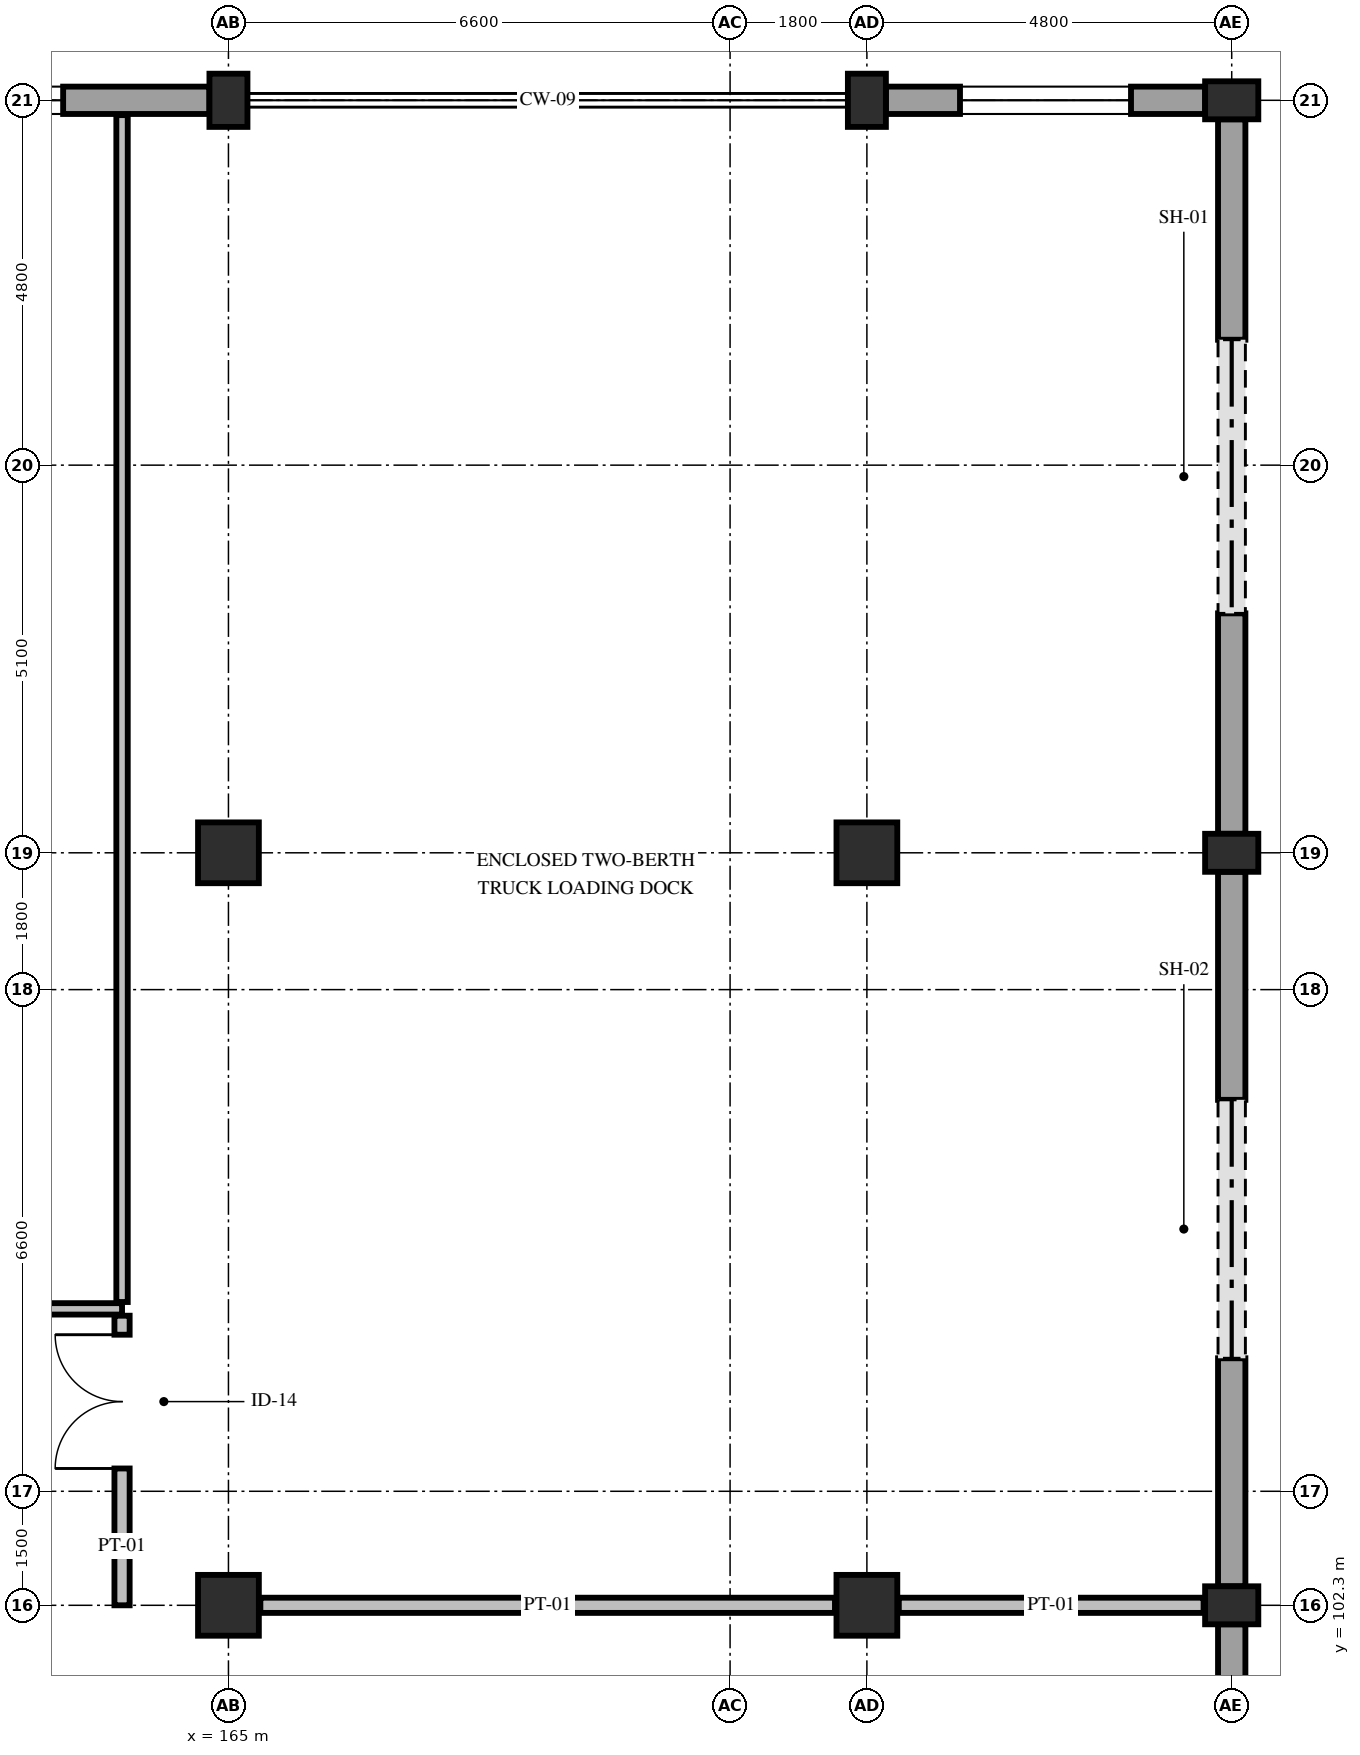
"""IFC4 building model, lengths in metres.
Left out: names, types, materials, properties, quantities, classifications, styles, units other than length and angle.
Written with IfcOpenShell. Run it as: python <this file> out.ifc"""

import sys

from ifc_helpers import new_model, si_unit, direction, frame, frame_2d, origin, origin_2d, place, context, subcontext, project, spatial, rectangle, extrude, element, fill, save


model = new_model("IFC4")
c1 = context("Model", 3, precision=1e-05, world=origin(), true_north=direction((0.0, 1.0)))
c2 = subcontext(c1, "Body", "Model", "MODEL_VIEW")
j1 = project(units=[si_unit("LENGTHUNIT", "METRE"), si_unit("PLANEANGLEUNIT", "RADIAN")], contexts=[c1])
p1 = place(None, origin())
s1 = spatial("IfcSite", under=j1, at=p1, CompositionType="ELEMENT")
p2 = place(p1, origin())
s2 = spatial("IfcBuilding", under=s1, at=p2, CompositionType="ELEMENT")
p3 = place(p2, origin())
s3 = spatial("IfcBuildingStorey", under=s2, at=p3, CompositionType="ELEMENT", Elevation=0.0)
for number, where, z_axis, x_axis in (
    (1, (165.0, 102.3, 0.0), (0.0, 0.0, 1.0), (1.0, 0.0, 0.0)),
    (2, (165.0, 112.2, 0.0), (0.0, 0.0, 1.0), (1.0, 0.0, 0.0)),
):
    element("IfcColumn", number, at=place(p3, frame(where, z_axis=z_axis, x_axis=x_axis)), inside=s3, PredefinedType="COLUMN", context=c2, shape_type="SweptSolid", body=[
        extrude(rectangle(XDim=0.8, YDim=0.8, at=origin_2d()), origin(), (0.0, 0.0, 1.0), 5.4),
    ])
p4 = place(p3, frame((165.0, 122.1, 0.0), z_axis=(0.0, 0.0, 1.0), x_axis=(1.0, 0.0, 0.0)))
e3 = element("IfcColumn", 3, at=p4, inside=s3, PredefinedType="PILASTER", context=c2, shape_type="SweptSolid", body=[
    extrude(rectangle(XDim=0.5, YDim=0.7, at=origin_2d()), origin(), (0.0, 0.0, 1.0), 5.4),
])
for number, where, z_axis, x_axis in (
    (4, (173.4, 102.3, 0.0), (0.0, 0.0, 1.0), (1.0, 0.0, 0.0)),
    (5, (173.4, 112.2, 0.0), (0.0, 0.0, 1.0), (1.0, 0.0, 0.0)),
):
    element("IfcColumn", number, at=place(p3, frame(where, z_axis=z_axis, x_axis=x_axis)), inside=s3, PredefinedType="COLUMN", context=c2, shape_type="SweptSolid", body=[
        extrude(rectangle(XDim=0.8, YDim=0.8, at=origin_2d()), origin(), (0.0, 0.0, 1.0), 5.4),
    ])
for number, where, z_axis, x_axis in (
    (6, (173.4, 122.1, 0.0), (0.0, 0.0, 1.0), (1.0, 0.0, 0.0)),
    (7, (178.2, 102.3, 0.0), (0.0, 0.0, 1.0), (0.0, 1.0, 0.0)),
    (8, (178.2, 112.2, 0.0), (0.0, 0.0, 1.0), (0.0, 1.0, 0.0)),
    (9, (178.2, 122.1, 0.0), (0.0, 0.0, 1.0), (0.0, 1.0, 0.0)),
):
    element("IfcColumn", number, at=place(p3, frame(where, z_axis=z_axis, x_axis=x_axis)), inside=s3, PredefinedType="PILASTER", context=c2, shape_type="SweptSolid", body=[
        extrude(rectangle(XDim=0.5, YDim=0.7, at=origin_2d()), origin(), (0.0, 0.0, 1.0), 5.4),
    ])
p5 = place(p3, frame((158.65, 122.1, 0.0), z_axis=(0.0, 0.0, 1.0), x_axis=(1.0, 0.0, 0.0)))
e10 = element("IfcWall", 10, at=p5, inside=s3, PredefinedType="STANDARD", context=c2, shape_type="SweptSolid", body=[
    extrude(rectangle(XDim=6.1, YDim=0.36, at=frame_2d((3.05, 0.0))), origin(), (0.0, 0.0, 1.0), 4.38),
])
p6 = place(p5, frame((1.925, 0.0, 0.85)))
e11 = element("IfcOpeningElement", 11, at=p6, cuts=e10, PredefinedType="OPENING", context=c2, shape_type="SweptSolid", body=[
    extrude(rectangle(XDim=2.25, YDim=1.88, at=frame_2d((1.125, 0.94))), frame((0.0, 0.195, 0.0), z_axis=(0.0, -1.0, 0.0), x_axis=(1.0, 0.0, 0.0)), (0.0, 0.0, 1.0), 0.39),
])
p7 = place(p3, frame((173.65, 122.1, 0.0), z_axis=(0.0, 0.0, 1.0), x_axis=(1.0, 0.0, 0.0)))
e12 = element("IfcWall", 12, at=p7, inside=s3, PredefinedType="STANDARD", context=c2, shape_type="SweptSolid", body=[
    extrude(rectangle(XDim=4.2, YDim=0.36, at=frame_2d((2.1, 0.0))), origin(), (0.0, 0.0, 1.0), 4.38),
])
p8 = place(p7, frame((0.975, 0.0, 0.85)))
e13 = element("IfcOpeningElement", 13, at=p8, cuts=e12, PredefinedType="OPENING", context=c2, shape_type="SweptSolid", body=[
    extrude(rectangle(XDim=2.25, YDim=1.88, at=frame_2d((1.125, 0.94))), frame((0.0, 0.195, 0.0), z_axis=(0.0, -1.0, 0.0), x_axis=(1.0, 0.0, 0.0)), (0.0, 0.0, 1.0), 0.39),
])
p9 = place(p3, frame((178.2, 121.85, 0.0), z_axis=(0.0, 0.0, 1.0), x_axis=(0.0, -1.0, 0.0)))
e14 = element("IfcWall", 14, at=p9, inside=s3, PredefinedType="STANDARD", context=c2, shape_type="SweptSolid", body=[
    extrude(rectangle(XDim=9.4, YDim=0.36, at=frame_2d((4.7, 0.0))), origin(), (0.0, 0.0, 1.0), 4.55),
])
p10 = place(p9, frame((2.9, 0.0, 0.0)))
e15 = element("IfcOpeningElement", 15, at=p10, cuts=e14, PredefinedType="OPENING", context=c2, shape_type="SweptSolid", body=[
    extrude(rectangle(XDim=3.6, YDim=4.1, at=frame_2d((1.8, 2.05))), frame((0.0, 0.195, 0.0), z_axis=(0.0, -1.0, 0.0), x_axis=(1.0, 0.0, 0.0)), (0.0, 0.0, 1.0), 0.39),
])
p11 = place(p3, frame((178.2, 111.95, 0.0), z_axis=(0.0, 0.0, 1.0), x_axis=(0.0, -1.0, 0.0)))
e16 = element("IfcWall", 16, at=p11, inside=s3, PredefinedType="STANDARD", context=c2, shape_type="SweptSolid", body=[
    extrude(rectangle(XDim=9.4, YDim=0.36, at=frame_2d((4.7, 0.0))), origin(), (0.0, 0.0, 1.0), 4.55),
])
p12 = place(p11, frame((3.0, 0.0, 0.0)))
e17 = element("IfcOpeningElement", 17, at=p12, cuts=e16, PredefinedType="OPENING", context=c2, shape_type="SweptSolid", body=[
    extrude(rectangle(XDim=3.4, YDim=4.0, at=frame_2d((1.7, 2.0))), frame((0.0, 0.195, 0.0), z_axis=(0.0, -1.0, 0.0), x_axis=(1.0, 0.0, 0.0)), (0.0, 0.0, 1.0), 0.39),
])
p13 = place(p3, frame((178.2, 102.05, 0.0), z_axis=(0.0, 0.0, 1.0), x_axis=(0.0, -1.0, 0.0)))
e18 = element("IfcWall", 18, at=p13, inside=s3, PredefinedType="STANDARD", context=c2, shape_type="SweptSolid", body=[
    extrude(rectangle(XDim=9.4, YDim=0.36, at=frame_2d((4.7, 0.0))), origin(), (0.0, 0.0, 1.0), 4.55),
])
p14 = place(p13, frame((1.267, 0.0, 0.85)))
e19 = element("IfcOpeningElement", 19, at=p14, cuts=e18, PredefinedType="OPENING", context=c2, shape_type="SweptSolid", body=[
    extrude(rectangle(XDim=2.8, YDim=1.88, at=frame_2d((1.4, 0.94))), frame((0.0, 0.195, 0.0), z_axis=(0.0, -1.0, 0.0), x_axis=(1.0, 0.0, 0.0)), (0.0, 0.0, 1.0), 0.39),
])
p15 = place(p13, frame((5.333, 0.0, 0.85)))
e20 = element("IfcOpeningElement", 20, at=p15, cuts=e18, PredefinedType="OPENING", context=c2, shape_type="SweptSolid", body=[
    extrude(rectangle(XDim=2.8, YDim=1.88, at=frame_2d((1.4, 0.94))), frame((0.0, 0.195, 0.0), z_axis=(0.0, -1.0, 0.0), x_axis=(1.0, 0.0, 0.0)), (0.0, 0.0, 1.0), 0.39),
])
p16 = place(p3, frame((137.89, 106.2, 0.0), z_axis=(0.0, 0.0, 1.0), x_axis=(1.0, 0.0, 0.0)))
e21 = element("IfcWall", 21, at=p16, inside=s3, PredefinedType="PARTITIONING", context=c2, shape_type="SweptSolid", body=[
    extrude(rectangle(XDim=25.71, YDim=0.15, at=frame_2d((12.855, 0.0))), origin(), (0.0, 0.0, 1.0), 4.38),
])
p17 = place(p16, frame((14.79, 0.0, 0.0)))
e22 = element("IfcOpeningElement", 22, at=p17, cuts=e21, PredefinedType="OPENING", context=c2, shape_type="SweptSolid", body=[
    extrude(rectangle(XDim=1.34, YDim=2.2, at=frame_2d((0.67, 1.1))), frame((0.0, 0.09, 0.0), z_axis=(0.0, -1.0, 0.0), x_axis=(1.0, 0.0, 0.0)), (0.0, 0.0, 1.0), 0.18),
])
p18 = place(p3, frame((163.6, 106.29, 0.0), z_axis=(0.0, 0.0, 1.0), x_axis=(0.0, 1.0, 0.0)))
e23 = element("IfcWall", 23, at=p18, inside=s3, PredefinedType="PARTITIONING", context=c2, shape_type="SweptSolid", body=[
    extrude(rectangle(XDim=15.615, YDim=0.15, at=frame_2d((7.808, 0.0))), origin(), (0.0, 0.0, 1.0), 4.53),
])
p19 = place(p3, frame((165.42, 102.3, 0.0), z_axis=(0.0, 0.0, 1.0), x_axis=(1.0, 0.0, 0.0)))
e24 = element("IfcWall", 24, at=p19, inside=s3, PredefinedType="PARTITIONING", context=c2, shape_type="SweptSolid", body=[
    extrude(rectangle(XDim=7.56, YDim=0.2, at=frame_2d((3.78, 0.0))), origin(), (0.0, 0.0, 1.0), 4.43),
])
p20 = place(p3, frame((173.82, 102.3, 0.0), z_axis=(0.0, 0.0, 1.0), x_axis=(1.0, 0.0, 0.0)))
e25 = element("IfcWall", 25, at=p20, inside=s3, PredefinedType="PARTITIONING", context=c2, shape_type="SweptSolid", body=[
    extrude(rectangle(XDim=4.01, YDim=0.2, at=frame_2d((2.005, 0.0))), origin(), (0.0, 0.0, 1.0), 4.665),
])
p21 = place(p3, frame((163.6, 102.3, 0.0), z_axis=(0.0, 0.0, 1.0), x_axis=(0.0, 1.0, 0.0)))
e26 = element("IfcWall", 26, at=p21, inside=s3, PredefinedType="PARTITIONING", context=c2, shape_type="SweptSolid", body=[
    extrude(rectangle(XDim=3.81, YDim=0.2, at=frame_2d((1.905, 0.0))), origin(), (0.0, 0.0, 1.0), 4.665),
])
p22 = place(p21, frame((1.8, 0.0, 0.0)))
e27 = element("IfcOpeningElement", 27, at=p22, cuts=e26, PredefinedType="OPENING", context=c2, shape_type="SweptSolid", body=[
    extrude(rectangle(XDim=1.76, YDim=2.35, at=frame_2d((0.88, 1.175))), frame((0.0, 0.115, 0.0), z_axis=(0.0, -1.0, 0.0), x_axis=(1.0, 0.0, 0.0)), (0.0, 0.0, 1.0), 0.23),
])
p23 = place(p6, origin())
e28 = element("IfcWindow", 28, at=p23, inside=s3, PartitioningType="DOUBLE_PANEL_VERTICAL", PredefinedType="WINDOW", context=c2, shape_type="SweptSolid", body=[
    extrude(rectangle(XDim=2.25, YDim=1.88, at=frame_2d((1.125, 0.94))), frame((0.0, 0.03, 0.0), z_axis=(0.0, -1.0, 0.0), x_axis=(1.0, 0.0, 0.0)), (0.0, 0.0, 1.0), 0.06),
])
fill(e11, e28)
p24 = place(p8, origin())
e29 = element("IfcWindow", 29, at=p24, inside=s3, PartitioningType="DOUBLE_PANEL_VERTICAL", PredefinedType="WINDOW", context=c2, shape_type="SweptSolid", body=[
    extrude(rectangle(XDim=2.25, YDim=1.88, at=frame_2d((1.125, 0.94))), frame((0.0, 0.03, 0.0), z_axis=(0.0, -1.0, 0.0), x_axis=(1.0, 0.0, 0.0)), (0.0, 0.0, 1.0), 0.06),
])
fill(e13, e29)
p25 = place(p10, origin())
e30 = element("IfcDoor", 30, at=p25, inside=s3, OperationType="ROLLINGUP", PredefinedType="DOOR", context=c2, shape_type="SweptSolid", body=[
    extrude(rectangle(XDim=3.6, YDim=4.1, at=frame_2d((1.8, 2.05))), frame((0.0, 0.025, 0.0), z_axis=(0.0, -1.0, 0.0), x_axis=(1.0, 0.0, 0.0)), (0.0, 0.0, 1.0), 0.05),
])
fill(e15, e30)
p26 = place(p12, origin())
e31 = element("IfcDoor", 31, at=p26, inside=s3, OperationType="ROLLINGUP", PredefinedType="DOOR", context=c2, shape_type="SweptSolid", body=[
    extrude(rectangle(XDim=3.4, YDim=4.0, at=frame_2d((1.7, 2.0))), frame((0.0, 0.025, 0.0), z_axis=(0.0, -1.0, 0.0), x_axis=(1.0, 0.0, 0.0)), (0.0, 0.0, 1.0), 0.05),
])
fill(e17, e31)
p27 = place(p22, origin())
e32 = element("IfcDoor", 32, at=p27, inside=s3, OperationType="DOUBLE_DOOR_SINGLE_SWING", PredefinedType="DOOR", context=c2, shape_type="SweptSolid", body=[
    extrude(rectangle(XDim=1.76, YDim=2.35, at=frame_2d((0.88, 1.175))), frame((0.0, 0.025, 0.0), z_axis=(0.0, -1.0, 0.0), x_axis=(1.0, 0.0, 0.0)), (0.0, 0.0, 1.0), 0.05),
])
fill(e27, e32)
save(model, sys.argv[1])
